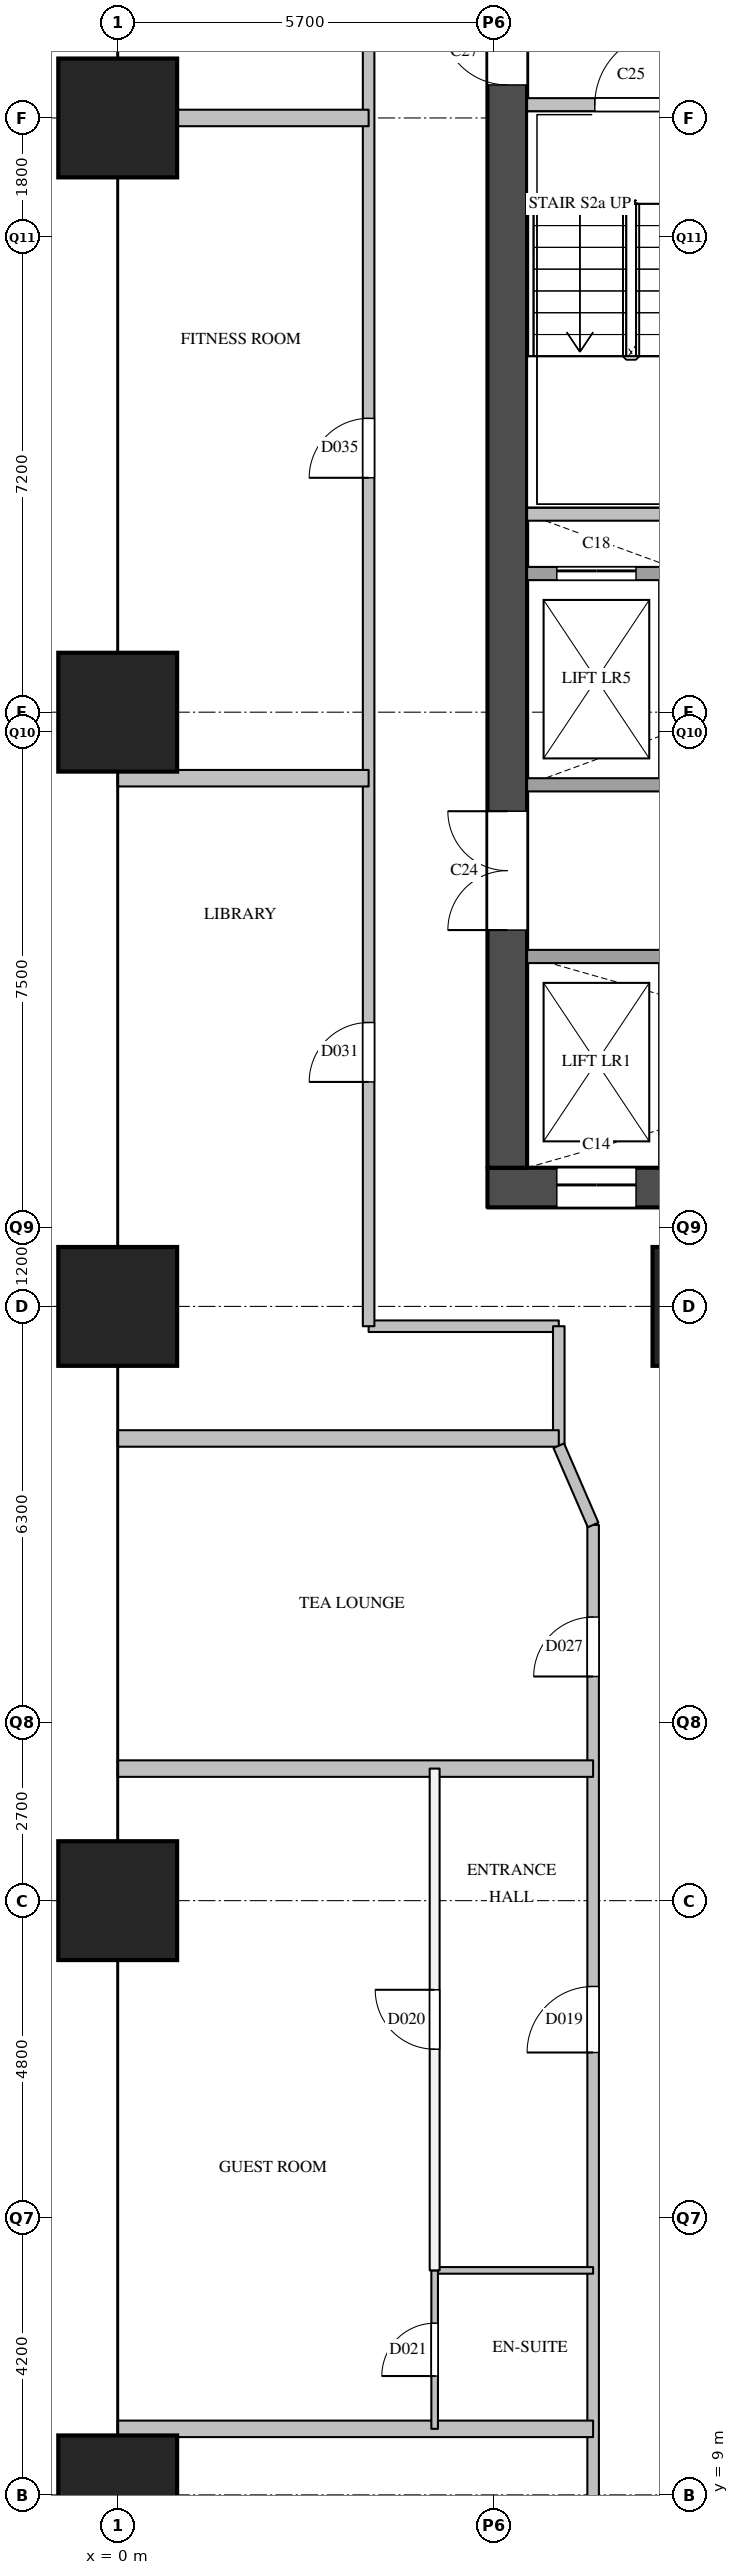
"""IFC4 building model, lengths in metres.
Left out: names, types, materials, properties, quantities, classifications, styles, units other than length and angle.
Written with IfcOpenShell. Run it as: python <this file> out.ifc"""

import sys

from ifc_helpers import new_model, si_unit, direction, frame, frame_2d, origin, origin_2d, place, context, subcontext, project, spatial, rectangle, extrude, element, fill, save


model = new_model("IFC4")
c1 = context("Model", 3, precision=1e-05, world=origin(), true_north=direction((0.0, 1.0)))
c2 = subcontext(c1, "Body", "Model", "MODEL_VIEW")
j1 = project(units=[si_unit("LENGTHUNIT", "METRE"), si_unit("PLANEANGLEUNIT", "RADIAN")], contexts=[c1])
p1 = place(None, origin())
s1 = spatial("IfcSite", under=j1, at=p1, CompositionType="ELEMENT")
p2 = place(p1, origin())
s2 = spatial("IfcBuilding", under=s1, at=p2, CompositionType="ELEMENT")
p3 = place(p2, frame((0.0, 0.0, 72.8)))
s3 = spatial("IfcBuildingStorey", under=s2, at=p3, CompositionType="ELEMENT", Elevation=72.8)
for number, where, z_axis, x_axis in (
    (1, (0.0, 9.0, 0.0), (0.0, 0.0, 1.0), (1.0, 0.0, 0.0)),
    (2, (0.0, 18.0, 0.0), (0.0, 0.0, 1.0), (1.0, 0.0, 0.0)),
    (3, (0.0, 27.0, 0.0), (0.0, 0.0, 1.0), (1.0, 0.0, 0.0)),
    (4, (0.0, 36.0, 0.0), (0.0, 0.0, 1.0), (1.0, 0.0, 0.0)),
    (5, (0.0, 45.0, 0.0), (0.0, 0.0, 1.0), (1.0, 0.0, 0.0)),
    (6, (9.0, 27.0, 0.0), (0.0, 0.0, 1.0), (1.0, 0.0, 0.0)),
):
    element("IfcColumn", number, at=place(p3, frame(where, z_axis=z_axis, x_axis=x_axis)), inside=s3, PredefinedType="COLUMN", context=c2, shape_type="SweptSolid", body=[
        extrude(rectangle(XDim=1.8, YDim=1.8, at=origin_2d()), origin(), (0.0, 0.0, 1.0), 5.0),
    ])
p4 = place(p3, frame((5.6, 28.8, 0.0), z_axis=(0.0, 0.0, 1.0), x_axis=(1.0, 0.0, 0.0)))
e7 = element("IfcWall", 7, at=p4, inside=s3, PredefinedType="SHEAR", context=c2, shape_type="SweptSolid", body=[
    extrude(rectangle(XDim=12.4, YDim=0.6, at=frame_2d((6.2, 0.0))), origin(), (0.0, 0.0, 1.0), 4.7),
])
p5 = place(p4, frame((1.05, 0.0, 0.0)))
e8 = element("IfcOpeningElement", 8, at=p5, cuts=e7, PredefinedType="OPENING", context=c2, shape_type="SweptSolid", body=[
    extrude(rectangle(XDim=1.2, YDim=2.1, at=frame_2d((0.6, 1.05))), frame((0.0, 0.31, 0.0), z_axis=(0.0, -1.0, 0.0), x_axis=(1.0, 0.0, 0.0)), (0.0, 0.0, 1.0), 0.62),
])
p6 = place(p4, frame((5.25, 0.0, 0.0)))
e9 = element("IfcOpeningElement", 9, at=p6, cuts=e7, PredefinedType="OPENING", context=c2, shape_type="SweptSolid", body=[
    extrude(rectangle(XDim=1.2, YDim=2.1, at=frame_2d((0.6, 1.05))), frame((0.0, 0.31, 0.0), z_axis=(0.0, -1.0, 0.0), x_axis=(1.0, 0.0, 0.0)), (0.0, 0.0, 1.0), 0.62),
])
p7 = place(p4, frame((7.35, 0.0, 0.0)))
e10 = element("IfcOpeningElement", 10, at=p7, cuts=e7, PredefinedType="OPENING", context=c2, shape_type="SweptSolid", body=[
    extrude(rectangle(XDim=1.2, YDim=2.1, at=frame_2d((0.6, 1.05))), frame((0.0, 0.31, 0.0), z_axis=(0.0, -1.0, 0.0), x_axis=(1.0, 0.0, 0.0)), (0.0, 0.0, 1.0), 0.62),
])
p8 = place(p3, frame((5.9, 29.1, 0.0), z_axis=(0.0, 0.0, 1.0), x_axis=(0.0, 1.0, 0.0)))
e11 = element("IfcWall", 11, at=p8, inside=s3, PredefinedType="SHEAR", context=c2, shape_type="SweptSolid", body=[
    extrude(rectangle(XDim=20.3, YDim=0.6, at=frame_2d((10.15, 0.0))), origin(), (0.0, 0.0, 1.0), 4.7),
])
p9 = place(p8, frame((3.6, 0.0, 0.0)))
e12 = element("IfcOpeningElement", 12, at=p9, cuts=e11, PredefinedType="OPENING", context=c2, shape_type="SweptSolid", body=[
    extrude(rectangle(XDim=1.8, YDim=2.1, at=frame_2d((0.9, 1.05))), frame((0.0, 0.31, 0.0), z_axis=(0.0, -1.0, 0.0), x_axis=(1.0, 0.0, 0.0)), (0.0, 0.0, 1.0), 0.62),
])
p10 = place(p8, frame((16.4, 0.0, 0.0)))
e13 = element("IfcOpeningElement", 13, at=p10, cuts=e11, PredefinedType="OPENING", context=c2, shape_type="SweptSolid", body=[
    extrude(rectangle(XDim=1.0, YDim=2.1, at=frame_2d((0.5, 1.05))), frame((0.0, 0.31, 0.0), z_axis=(0.0, -1.0, 0.0), x_axis=(1.0, 0.0, 0.0)), (0.0, 0.0, 1.0), 0.62),
])
p11 = place(p3, frame((6.2, 32.3, 0.0), z_axis=(0.0, 0.0, 1.0), x_axis=(1.0, 0.0, 0.0)))
e14 = element("IfcWall", 14, at=p11, inside=s3, PredefinedType="SOLIDWALL", context=c2, shape_type="SweptSolid", body=[
    extrude(rectangle(XDim=11.2, YDim=0.2, at=frame_2d((5.6, 0.0))), origin(), (0.0, 0.0, 1.0), 4.7),
])
p12 = place(p11, frame((2.55, 0.0, 0.0)))
e15 = element("IfcOpeningElement", 15, at=p12, cuts=e14, PredefinedType="OPENING", context=c2, shape_type="SweptSolid", body=[
    extrude(rectangle(XDim=1.2, YDim=2.1, at=frame_2d((0.6, 1.05))), frame((0.0, 0.11, 0.0), z_axis=(0.0, -1.0, 0.0), x_axis=(1.0, 0.0, 0.0)), (0.0, 0.0, 1.0), 0.22),
])
p13 = place(p3, frame((6.2, 34.9, 0.0), z_axis=(0.0, 0.0, 1.0), x_axis=(1.0, 0.0, 0.0)))
e16 = element("IfcWall", 16, at=p13, inside=s3, PredefinedType="SOLIDWALL", context=c2, shape_type="SweptSolid", body=[
    extrude(rectangle(XDim=11.2, YDim=0.2, at=frame_2d((5.6, 0.0))), origin(), (0.0, 0.0, 1.0), 4.7),
])
p14 = place(p3, frame((6.2, 38.1, 0.0), z_axis=(0.0, 0.0, 1.0), x_axis=(1.0, 0.0, 0.0)))
e17 = element("IfcWall", 17, at=p14, inside=s3, PredefinedType="SOLIDWALL", context=c2, shape_type="SweptSolid", body=[
    extrude(rectangle(XDim=11.2, YDim=0.2, at=frame_2d((5.6, 0.0))), origin(), (0.0, 0.0, 1.0), 4.7),
])
p15 = place(p14, frame((0.45, 0.0, 0.0)))
e18 = element("IfcOpeningElement", 18, at=p15, cuts=e17, PredefinedType="OPENING", context=c2, shape_type="SweptSolid", body=[
    extrude(rectangle(XDim=1.2, YDim=2.1, at=frame_2d((0.6, 1.05))), frame((0.0, 0.11, 0.0), z_axis=(0.0, -1.0, 0.0), x_axis=(1.0, 0.0, 0.0)), (0.0, 0.0, 1.0), 0.22),
])
p16 = place(p14, frame((2.55, 0.0, 0.0)))
e19 = element("IfcOpeningElement", 19, at=p16, cuts=e17, PredefinedType="OPENING", context=c2, shape_type="SweptSolid", body=[
    extrude(rectangle(XDim=1.2, YDim=2.1, at=frame_2d((0.6, 1.05))), frame((0.0, 0.11, 0.0), z_axis=(0.0, -1.0, 0.0), x_axis=(1.0, 0.0, 0.0)), (0.0, 0.0, 1.0), 0.22),
])
p17 = place(p14, frame((4.65, 0.0, 0.0)))
e20 = element("IfcOpeningElement", 20, at=p17, cuts=e17, PredefinedType="OPENING", context=c2, shape_type="SweptSolid", body=[
    extrude(rectangle(XDim=1.2, YDim=2.1, at=frame_2d((0.6, 1.05))), frame((0.0, 0.11, 0.0), z_axis=(0.0, -1.0, 0.0), x_axis=(1.0, 0.0, 0.0)), (0.0, 0.0, 1.0), 0.22),
])
p18 = place(p14, frame((6.75, 0.0, 0.0)))
e21 = element("IfcOpeningElement", 21, at=p18, cuts=e17, PredefinedType="OPENING", context=c2, shape_type="SweptSolid", body=[
    extrude(rectangle(XDim=1.2, YDim=2.1, at=frame_2d((0.6, 1.05))), frame((0.0, 0.11, 0.0), z_axis=(0.0, -1.0, 0.0), x_axis=(1.0, 0.0, 0.0)), (0.0, 0.0, 1.0), 0.22),
])
p19 = place(p3, frame((6.2, 39.0, 0.0), z_axis=(0.0, 0.0, 1.0), x_axis=(1.0, 0.0, 0.0)))
e22 = element("IfcWall", 22, at=p19, inside=s3, PredefinedType="SOLIDWALL", context=c2, shape_type="SweptSolid", body=[
    extrude(rectangle(XDim=3.05, YDim=0.2, at=frame_2d((1.525, 0.0))), origin(), (0.0, 0.0, 1.0), 4.7),
])
p20 = place(p3, frame((6.2, 45.2, 0.0), z_axis=(0.0, 0.0, 1.0), x_axis=(1.0, 0.0, 0.0)))
e23 = element("IfcWall", 23, at=p20, inside=s3, PredefinedType="SOLIDWALL", context=c2, shape_type="SweptSolid", body=[
    extrude(rectangle(XDim=3.05, YDim=0.2, at=frame_2d((1.525, 0.0))), origin(), (0.0, 0.0, 1.0), 4.7),
])
p21 = place(p20, frame((1.025, 0.0, 0.0)))
e24 = element("IfcOpeningElement", 24, at=p21, cuts=e23, PredefinedType="OPENING", context=c2, shape_type="SweptSolid", body=[
    extrude(rectangle(XDim=1.1, YDim=2.1, at=frame_2d((0.55, 1.05))), frame((0.0, 0.11, 0.0), z_axis=(0.0, -1.0, 0.0), x_axis=(1.0, 0.0, 0.0)), (0.0, 0.0, 1.0), 0.22),
])
p22 = place(p3, frame((3.8, 26.7, 0.0), z_axis=(0.0, 0.0, 1.0), x_axis=(1.0, 0.0, 0.0)))
e25 = element("IfcWall", 25, at=p22, inside=s3, PredefinedType="PARTITIONING", context=c2, shape_type="SweptSolid", body=[
    extrude(rectangle(XDim=2.88, YDim=0.175, at=frame_2d((1.44, 0.0))), origin(), (0.0, 0.0, 1.0), 3.59),
])
p23 = place(p3, frame((3.8, 26.7, 0.0), z_axis=(0.0, 0.0, 1.0), x_axis=(0.0, 1.0, 0.0)))
e26 = element("IfcWall", 26, at=p23, inside=s3, PredefinedType="PARTITIONING", context=c2, shape_type="SweptSolid", body=[
    extrude(rectangle(XDim=25.1, YDim=0.175, at=frame_2d((12.55, 0.0))), origin(), (0.0, 0.0, 1.0), 3.59),
])
p24 = place(p23, frame((3.7, 0.0, 0.0)))
e27 = element("IfcOpeningElement", 27, at=p24, cuts=e26, PredefinedType="OPENING", context=c2, shape_type="SweptSolid", body=[
    extrude(rectangle(XDim=0.9, YDim=2.1, at=frame_2d((0.45, 1.05))), frame((0.0, 0.097, 0.0), z_axis=(0.0, -1.0, 0.0), x_axis=(1.0, 0.0, 0.0)), (0.0, 0.0, 1.0), 0.195),
])
p25 = place(p23, frame((12.85, 0.0, 0.0)))
e28 = element("IfcOpeningElement", 28, at=p25, cuts=e26, PredefinedType="OPENING", context=c2, shape_type="SweptSolid", body=[
    extrude(rectangle(XDim=0.9, YDim=2.1, at=frame_2d((0.45, 1.05))), frame((0.0, 0.097, 0.0), z_axis=(0.0, -1.0, 0.0), x_axis=(1.0, 0.0, 0.0)), (0.0, 0.0, 1.0), 0.195),
])
p26 = place(p23, frame((21.25, 0.0, 0.0)))
e29 = element("IfcOpeningElement", 29, at=p26, cuts=e26, PredefinedType="OPENING", context=c2, shape_type="SweptSolid", body=[
    extrude(rectangle(XDim=0.9, YDim=2.1, at=frame_2d((0.45, 1.05))), frame((0.0, 0.097, 0.0), z_axis=(0.0, -1.0, 0.0), x_axis=(1.0, 0.0, 0.0)), (0.0, 0.0, 1.0), 0.195),
])
p27 = place(p3, frame((6.68, 24.89, 0.0), z_axis=(0.0, 0.0, 1.0), x_axis=(0.0, 1.0, 0.0)))
e30 = element("IfcWall", 30, at=p27, inside=s3, PredefinedType="PARTITIONING", context=c2, shape_type="SweptSolid", body=[
    extrude(rectangle(XDim=1.81, YDim=0.175, at=frame_2d((0.905, 0.0))), origin(), (0.0, 0.0, 1.0), 3.59),
])
p28 = place(p3, frame((7.2, 7.2, 0.0), z_axis=(0.0, 0.0, 1.0), x_axis=(0.0, 1.0, 0.0)))
e31 = element("IfcWall", 31, at=p28, inside=s3, PredefinedType="PARTITIONING", context=c2, shape_type="SweptSolid", body=[
    extrude(rectangle(XDim=16.49, YDim=0.175, at=frame_2d((8.245, 0.0))), origin(), (0.0, 0.0, 1.0), 4.7),
])
p29 = place(p28, frame((8.5, 0.0, 0.0)))
e32 = element("IfcOpeningElement", 32, at=p29, cuts=e31, PredefinedType="OPENING", context=c2, shape_type="SweptSolid", body=[
    extrude(rectangle(XDim=1.0, YDim=2.1, at=frame_2d((0.5, 1.05))), frame((0.0, 0.097, 0.0), z_axis=(0.0, -1.0, 0.0), x_axis=(1.0, 0.0, 0.0)), (0.0, 0.0, 1.0), 0.195),
])
p30 = place(p28, frame((14.195, 0.0, 0.0)))
e33 = element("IfcOpeningElement", 33, at=p30, cuts=e31, PredefinedType="OPENING", context=c2, shape_type="SweptSolid", body=[
    extrude(rectangle(XDim=0.9, YDim=2.1, at=frame_2d((0.45, 1.05))), frame((0.0, 0.097, 0.0), z_axis=(0.0, -1.0, 0.0), x_axis=(1.0, 0.0, 0.0)), (0.0, 0.0, 1.0), 0.195),
])
p31 = place(p3, frame((4.8, 12.4, 0.0), z_axis=(0.0, 0.0, 1.0), x_axis=(0.0, 1.0, 0.0)))
e34 = element("IfcWall", 34, at=p31, inside=s3, PredefinedType="PARTITIONING", context=c2, shape_type="SweptSolid", body=[
    extrude(rectangle(XDim=7.6, YDim=0.15, at=frame_2d((3.8, 0.0))), origin(), (0.0, 0.0, 1.0), 4.7),
])
p32 = place(p31, frame((3.35, 0.0, 0.0)))
e35 = element("IfcOpeningElement", 35, at=p32, cuts=e34, PredefinedType="OPENING", context=c2, shape_type="SweptSolid", body=[
    extrude(rectangle(XDim=0.9, YDim=2.1, at=frame_2d((0.45, 1.05))), frame((0.0, 0.085, 0.0), z_axis=(0.0, -1.0, 0.0), x_axis=(1.0, 0.0, 0.0)), (0.0, 0.0, 1.0), 0.17),
])
for number, where, z_axis, x_axis in (
    (36, (0.0, 10.0, 0.0), (0.0, 0.0, 1.0), (1.0, 0.0, 0.0)),
    (37, (0.0, 20.0, 0.0), (0.0, 0.0, 1.0), (1.0, 0.0, 0.0)),
):
    element("IfcWall", number, at=place(p3, frame(where, z_axis=z_axis, x_axis=x_axis)), inside=s3, PredefinedType="PARTITIONING", context=c2, shape_type="SweptSolid", body=[
        extrude(rectangle(XDim=7.2, YDim=0.25, at=frame_2d((3.6, 0.0))), origin(), (0.0, 0.0, 1.0), 3.59),
    ])
p33 = place(p3, frame((0.0, 25.0, 0.0), z_axis=(0.0, 0.0, 1.0), x_axis=(1.0, 0.0, 0.0)))
e38 = element("IfcWall", 38, at=p33, inside=s3, PredefinedType="PARTITIONING", context=c2, shape_type="SweptSolid", body=[
    extrude(rectangle(XDim=6.68, YDim=0.25, at=frame_2d((3.34, 0.0))), origin(), (0.0, 0.0, 1.0), 3.59),
])
p34 = place(p3, frame((0.0, 35.0, 0.0), z_axis=(0.0, 0.0, 1.0), x_axis=(1.0, 0.0, 0.0)))
e39 = element("IfcWall", 39, at=p34, inside=s3, PredefinedType="PARTITIONING", context=c2, shape_type="SweptSolid", body=[
    extrude(rectangle(XDim=3.8, YDim=0.25, at=frame_2d((1.9, 0.0))), origin(), (0.0, 0.0, 1.0), 3.7),
])
p35 = place(p3, frame((0.0, 45.0, 0.0), z_axis=(0.0, 0.0, 1.0), x_axis=(1.0, 0.0, 0.0)))
e40 = element("IfcWall", 40, at=p35, inside=s3, PredefinedType="PARTITIONING", context=c2, shape_type="SweptSolid", body=[
    extrude(rectangle(XDim=3.8, YDim=0.25, at=frame_2d((1.9, 0.0))), origin(), (0.0, 0.0, 1.0), 4.7),
])
p36 = place(p3, frame((4.8, 12.4, 0.0), z_axis=(0.0, 0.0, 1.0), x_axis=(1.0, 0.0, 0.0)))
e41 = element("IfcWall", 41, at=p36, inside=s3, PredefinedType="PARTITIONING", context=c2, shape_type="SweptSolid", body=[
    extrude(rectangle(XDim=2.4, YDim=0.1, at=frame_2d((1.2, 0.0))), origin(), (0.0, 0.0, 1.0), 4.7),
])
p37 = place(p3, frame((4.8, 10.0, 0.0), z_axis=(0.0, 0.0, 1.0), x_axis=(0.0, 1.0, 0.0)))
e42 = element("IfcWall", 42, at=p37, inside=s3, PredefinedType="PARTITIONING", context=c2, shape_type="SweptSolid", body=[
    extrude(rectangle(XDim=2.4, YDim=0.1, at=frame_2d((1.2, 0.0))), origin(), (0.0, 0.0, 1.0), 4.7),
])
p38 = place(p37, frame((0.8, 0.0, 0.0)))
e43 = element("IfcOpeningElement", 43, at=p38, cuts=e42, PredefinedType="OPENING", context=c2, shape_type="SweptSolid", body=[
    extrude(rectangle(XDim=0.8, YDim=2.1, at=frame_2d((0.4, 1.05))), frame((0.0, 0.06, 0.0), z_axis=(0.0, -1.0, 0.0), x_axis=(1.0, 0.0, 0.0)), (0.0, 0.0, 1.0), 0.12),
])
p39 = place(p3, frame((7.2, 23.69, 0.0), z_axis=(0.0, 0.0, 1.0), x_axis=(-0.397633632391, 0.917544273804, 0.0)))
e44 = element("IfcWall", 44, at=p39, inside=s3, PredefinedType="PARTITIONING", context=c2, shape_type="SweptSolid", body=[
    extrude(rectangle(XDim=1.308, YDim=0.175, at=frame_2d((0.654, 0.0))), origin(), (0.0, 0.0, 1.0), 4.7),
])
p40 = place(p5, origin())
e45 = element("IfcDoor", 45, at=p40, inside=s3, OperationType="SLIDING_TO_LEFT", PredefinedType="DOOR", context=c2, shape_type="SweptSolid", body=[
    extrude(rectangle(XDim=1.2, YDim=2.1, at=frame_2d((0.6, 1.05))), frame((0.0, 0.025, 0.0), z_axis=(0.0, -1.0, 0.0), x_axis=(1.0, 0.0, 0.0)), (0.0, 0.0, 1.0), 0.05),
])
fill(e8, e45)
p41 = place(p15, origin())
e46 = element("IfcDoor", 46, at=p41, inside=s3, OperationType="SLIDING_TO_LEFT", PredefinedType="DOOR", context=c2, shape_type="SweptSolid", body=[
    extrude(rectangle(XDim=1.2, YDim=2.1, at=frame_2d((0.6, 1.05))), frame((0.0, 0.025, 0.0), z_axis=(0.0, -1.0, 0.0), x_axis=(1.0, 0.0, 0.0)), (0.0, 0.0, 1.0), 0.05),
])
fill(e18, e46)
p42 = place(p9, origin())
e47 = element("IfcDoor", 47, at=p42, inside=s3, OperationType="DOUBLE_DOOR_SINGLE_SWING", PredefinedType="DOOR", context=c2, shape_type="SweptSolid", body=[
    extrude(rectangle(XDim=1.8, YDim=2.1, at=frame_2d((0.9, 1.05))), frame((0.0, 0.025, 0.0), z_axis=(0.0, -1.0, 0.0), x_axis=(1.0, 0.0, 0.0)), (0.0, 0.0, 1.0), 0.05),
])
fill(e12, e47)
p43 = place(p21, origin())
e48 = element("IfcDoor", 48, at=p43, inside=s3, OperationType="SINGLE_SWING_RIGHT", PredefinedType="DOOR", context=c2, shape_type="SweptSolid", body=[
    extrude(rectangle(XDim=1.1, YDim=2.1, at=frame_2d((0.55, 1.05))), frame((0.0, 0.025, 0.0), z_axis=(0.0, -1.0, 0.0), x_axis=(1.0, 0.0, 0.0)), (0.0, 0.0, 1.0), 0.05),
])
fill(e24, e48)
p44 = place(p10, origin())
e49 = element("IfcDoor", 49, at=p44, inside=s3, OperationType="SINGLE_SWING_RIGHT", PredefinedType="DOOR", context=c2, shape_type="SweptSolid", body=[
    extrude(rectangle(XDim=1.0, YDim=2.1, at=frame_2d((0.5, 1.05))), frame((0.0, 0.025, 0.0), z_axis=(0.0, -1.0, 0.0), x_axis=(1.0, 0.0, 0.0)), (0.0, 0.0, 1.0), 0.05),
])
fill(e13, e49)
p45 = place(p29, origin())
e50 = element("IfcDoor", 50, at=p45, inside=s3, OperationType="SINGLE_SWING_LEFT", PredefinedType="DOOR", context=c2, shape_type="SweptSolid", body=[
    extrude(rectangle(XDim=1.0, YDim=2.1, at=frame_2d((0.5, 1.05))), frame((0.0, 0.025, 0.0), z_axis=(0.0, -1.0, 0.0), x_axis=(1.0, 0.0, 0.0)), (0.0, 0.0, 1.0), 0.05),
])
fill(e32, e50)
p46 = place(p32, origin())
e51 = element("IfcDoor", 51, at=p46, inside=s3, OperationType="SINGLE_SWING_RIGHT", PredefinedType="DOOR", context=c2, shape_type="SweptSolid", body=[
    extrude(rectangle(XDim=0.9, YDim=2.1, at=frame_2d((0.45, 1.05))), frame((0.0, 0.025, 0.0), z_axis=(0.0, -1.0, 0.0), x_axis=(1.0, 0.0, 0.0)), (0.0, 0.0, 1.0), 0.05),
])
fill(e35, e51)
p47 = place(p38, origin())
e52 = element("IfcDoor", 52, at=p47, inside=s3, OperationType="SINGLE_SWING_LEFT", PredefinedType="DOOR", context=c2, shape_type="SweptSolid", body=[
    extrude(rectangle(XDim=0.8, YDim=2.1, at=frame_2d((0.4, 1.05))), frame((0.0, 0.025, 0.0), z_axis=(0.0, -1.0, 0.0), x_axis=(1.0, 0.0, 0.0)), (0.0, 0.0, 1.0), 0.05),
])
fill(e43, e52)
p48 = place(p30, origin())
e53 = element("IfcDoor", 53, at=p48, inside=s3, OperationType="SINGLE_SWING_LEFT", PredefinedType="DOOR", context=c2, shape_type="SweptSolid", body=[
    extrude(rectangle(XDim=0.9, YDim=2.1, at=frame_2d((0.45, 1.05))), frame((0.0, 0.025, 0.0), z_axis=(0.0, -1.0, 0.0), x_axis=(1.0, 0.0, 0.0)), (0.0, 0.0, 1.0), 0.05),
])
fill(e33, e53)
p49 = place(p24, origin())
e54 = element("IfcDoor", 54, at=p49, inside=s3, OperationType="SINGLE_SWING_LEFT", PredefinedType="DOOR", context=c2, shape_type="SweptSolid", body=[
    extrude(rectangle(XDim=0.9, YDim=2.1, at=frame_2d((0.45, 1.05))), frame((0.0, 0.025, 0.0), z_axis=(0.0, -1.0, 0.0), x_axis=(1.0, 0.0, 0.0)), (0.0, 0.0, 1.0), 0.05),
])
fill(e27, e54)
p50 = place(p25, origin())
e55 = element("IfcDoor", 55, at=p50, inside=s3, OperationType="SINGLE_SWING_LEFT", PredefinedType="DOOR", context=c2, shape_type="SweptSolid", body=[
    extrude(rectangle(XDim=0.9, YDim=2.1, at=frame_2d((0.45, 1.05))), frame((0.0, 0.025, 0.0), z_axis=(0.0, -1.0, 0.0), x_axis=(1.0, 0.0, 0.0)), (0.0, 0.0, 1.0), 0.05),
])
fill(e28, e55)
save(model, sys.argv[1])
